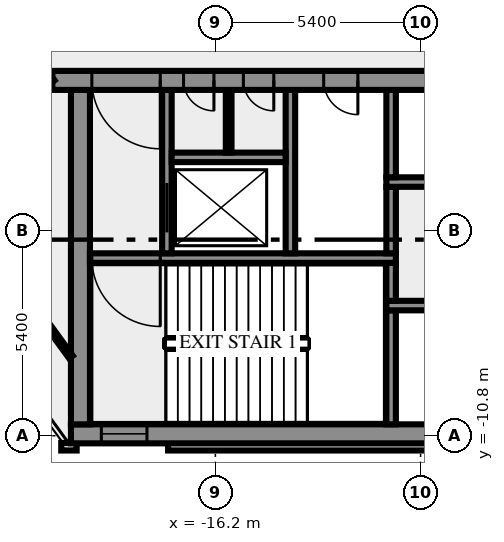
"""IFC4 building model, lengths in metres.
Left out: names, types, materials, properties, quantities, classifications, styles, units other than length and angle.
Written with IfcOpenShell. Run it as: python <this file> out.ifc"""

import sys

from ifc_helpers import new_model, si_unit, direction, frame, frame_2d, origin, place, context, subcontext, project, spatial, rectangle, extrude, element, fill, save


model = new_model("IFC4")
c1 = context("Model", 3, precision=1e-05, world=origin(), true_north=direction((0.0, 1.0)))
c2 = subcontext(c1, "Body", "Model", "MODEL_VIEW")
j1 = project(units=[si_unit("LENGTHUNIT", "METRE"), si_unit("PLANEANGLEUNIT", "RADIAN")], contexts=[c1])
p1 = place(None, origin())
s1 = spatial("IfcSite", under=j1, at=p1, CompositionType="ELEMENT")
p2 = place(p1, origin())
s2 = spatial("IfcBuilding", under=s1, at=p2, CompositionType="ELEMENT")
p3 = place(p2, frame((0.0, 0.0, 273.0)))
s3 = spatial("IfcBuildingStorey", under=s2, at=p3, CompositionType="ELEMENT", Elevation=273.0)
p4 = place(p3, frame((-20.256, -11.088, 0.0), z_axis=(0.0, 0.0, 1.0), x_axis=(1.0, 0.0, 0.0)))
e1 = element("IfcWall", 1, at=p4, inside=s3, PredefinedType="SOLIDWALL", context=c2, shape_type="SweptSolid", body=[
    extrude(rectangle(XDim=0.406, YDim=0.2, at=frame_2d((0.203, 0.0))), origin(), (0.0, 0.0, 1.0), 7.65),
])
p5 = place(p3, frame((-17.444, -11.088, 0.0), z_axis=(0.0, 0.0, 1.0), x_axis=(1.0, 0.0, 0.0)))
e2 = element("IfcWall", 2, at=p5, inside=s3, PredefinedType="SOLIDWALL", context=c2, shape_type="SweptSolid", body=[
    extrude(rectangle(XDim=34.888, YDim=0.2, at=frame_2d((17.444, 0.0))), origin(), (0.0, 0.0, 1.0), 7.65),
])
p6 = place(p3, frame((-20.0, -10.75, 0.0), z_axis=(0.0, 0.0, 1.0), x_axis=(1.0, 0.0, 0.0)))
e3 = element("IfcWall", 3, at=p6, inside=s3, PredefinedType="SHEAR", context=c2, shape_type="SweptSolid", body=[
    extrude(rectangle(XDim=40.0, YDim=0.5, at=frame_2d((20.0, 0.0))), origin(), (0.0, 0.0, 1.0), 7.65),
])
p7 = place(p6, frame((0.8, 0.0, 1.0)))
e4 = element("IfcOpeningElement", 4, at=p7, cuts=e3, PredefinedType="OPENING", context=c2, shape_type="SweptSolid", body=[
    extrude(rectangle(XDim=1.2, YDim=1.2, at=frame_2d((0.6, 0.6))), frame((0.0, 0.26, 0.0), z_axis=(0.0, -1.0, 0.0), x_axis=(1.0, 0.0, 0.0)), (0.0, 0.0, 1.0), 0.52),
])
p8 = place(p6, frame((38.0, 0.0, 1.0)))
e5 = element("IfcOpeningElement", 5, at=p8, cuts=e3, PredefinedType="OPENING", context=c2, shape_type="SweptSolid", body=[
    extrude(rectangle(XDim=1.2, YDim=1.2, at=frame_2d((0.6, 0.6))), frame((0.0, 0.26, 0.0), z_axis=(0.0, -1.0, 0.0), x_axis=(1.0, 0.0, 0.0)), (0.0, 0.0, 1.0), 0.52),
])
p9 = place(p3, frame((-19.75, -10.5, 0.0), z_axis=(0.0, 0.0, 1.0), x_axis=(0.0, 1.0, 0.0)))
e6 = element("IfcWall", 6, at=p9, inside=s3, PredefinedType="SHEAR", context=c2, shape_type="SweptSolid", body=[
    extrude(rectangle(XDim=8.8, YDim=0.5, at=frame_2d((4.4, 0.0))), origin(), (0.0, 0.0, 1.0), 7.65),
])
p10 = place(p3, frame((-11.575, -10.5, 0.0), z_axis=(0.0, 0.0, 1.0), x_axis=(0.0, 1.0, 0.0)))
e7 = element("IfcWall", 7, at=p10, inside=s3, PredefinedType="SHEAR", context=c2, shape_type="SweptSolid", body=[
    extrude(rectangle(XDim=3.0, YDim=0.25, at=frame_2d((1.5, 0.0))), origin(), (0.0, 0.0, 1.0), 7.65),
])
p11 = place(p3, frame((11.7, -7.375, 0.0), z_axis=(0.0, 0.0, 1.0), x_axis=(-1.0, 0.0, 0.0)))
e8 = element("IfcWall", 8, at=p11, inside=s3, PredefinedType="SHEAR", context=c2, shape_type="SweptSolid", body=[
    extrude(rectangle(XDim=23.4, YDim=0.25, at=frame_2d((11.7, 0.0))), origin(), (0.0, 0.0, 1.0), 7.65),
])
p12 = place(p11, frame((14.5, 0.0, 0.0)))
e9 = element("IfcOpeningElement", 9, at=p12, cuts=e8, PredefinedType="OPENING", context=c2, shape_type="SweptSolid", body=[
    extrude(rectangle(XDim=0.9, YDim=2.1, at=frame_2d((0.45, 1.05))), frame((0.0, 0.135, 0.0), z_axis=(0.0, -1.0, 0.0), x_axis=(1.0, 0.0, 0.0)), (0.0, 0.0, 1.0), 0.27),
])
p13 = place(p11, frame((12.95, 0.0, 0.0)))
e10 = element("IfcOpeningElement", 10, at=p13, cuts=e8, PredefinedType="OPENING", context=c2, shape_type="SweptSolid", body=[
    extrude(rectangle(XDim=0.9, YDim=2.1, at=frame_2d((0.45, 1.05))), frame((0.0, 0.135, 0.0), z_axis=(0.0, -1.0, 0.0), x_axis=(1.0, 0.0, 0.0)), (0.0, 0.0, 1.0), 0.27),
])
p14 = place(p11, frame((10.95, 0.0, 0.0)))
e11 = element("IfcOpeningElement", 11, at=p14, cuts=e8, PredefinedType="OPENING", context=c2, shape_type="SweptSolid", body=[
    extrude(rectangle(XDim=0.9, YDim=2.1, at=frame_2d((0.45, 1.05))), frame((0.0, 0.135, 0.0), z_axis=(0.0, -1.0, 0.0), x_axis=(1.0, 0.0, 0.0)), (0.0, 0.0, 1.0), 0.27),
])
p15 = place(p11, frame((7.6, 0.0, 0.0)))
e12 = element("IfcOpeningElement", 12, at=p15, cuts=e8, PredefinedType="OPENING", context=c2, shape_type="SweptSolid", body=[
    extrude(rectangle(XDim=0.9, YDim=2.1, at=frame_2d((0.45, 1.05))), frame((0.0, 0.135, 0.0), z_axis=(0.0, -1.0, 0.0), x_axis=(1.0, 0.0, 0.0)), (0.0, 0.0, 1.0), 0.27),
])
p16 = place(p11, frame((2.338, 0.0, 0.0)))
e13 = element("IfcOpeningElement", 13, at=p16, cuts=e8, PredefinedType="OPENING", context=c2, shape_type="SweptSolid", body=[
    extrude(rectangle(XDim=0.9, YDim=2.1, at=frame_2d((0.45, 1.05))), frame((0.0, 0.135, 0.0), z_axis=(0.0, -1.0, 0.0), x_axis=(1.0, 0.0, 0.0)), (0.0, 0.0, 1.0), 0.27),
])
p17 = place(p3, frame((-11.575, -7.25, 0.0), z_axis=(0.0, 0.0, 1.0), x_axis=(0.0, 1.0, 0.0)))
e14 = element("IfcWall", 14, at=p17, inside=s3, PredefinedType="SHEAR", context=c2, shape_type="SweptSolid", body=[
    extrude(rectangle(XDim=1.0, YDim=0.25, at=frame_2d((0.5, 0.0))), origin(), (0.0, 0.0, 1.0), 7.65),
])
p18 = place(p3, frame((-11.45, -6.125, 0.0), z_axis=(0.0, 0.0, 1.0), x_axis=(-1.0, 0.0, 0.0)))
e15 = element("IfcWall", 15, at=p18, inside=s3, PredefinedType="SHEAR", context=c2, shape_type="SweptSolid", body=[
    extrude(rectangle(XDim=8.05, YDim=0.25, at=frame_2d((4.025, 0.0))), origin(), (0.0, 0.0, 1.0), 7.65),
])
p19 = place(p18, frame((6.2, 0.0, 0.0)))
e16 = element("IfcOpeningElement", 16, at=p19, cuts=e15, PredefinedType="OPENING", context=c2, shape_type="SweptSolid", body=[
    extrude(rectangle(XDim=1.8, YDim=2.1, at=frame_2d((0.9, 1.05))), frame((0.0, 0.135, 0.0), z_axis=(0.0, -1.0, 0.0), x_axis=(1.0, 0.0, 0.0)), (0.0, 0.0, 1.0), 0.27),
])
p20 = place(p3, frame((-17.475, -6.0, 0.0), z_axis=(0.0, 0.0, 1.0), x_axis=(0.0, 1.0, 0.0)))
e17 = element("IfcWall", 17, at=p20, inside=s3, PredefinedType="SHEAR", context=c2, shape_type="SweptSolid", body=[
    extrude(rectangle(XDim=4.3, YDim=0.25, at=frame_2d((2.15, 0.0))), origin(), (0.0, 0.0, 1.0), 7.65),
])
p21 = place(p20, frame((0.55, 0.0, 0.0)))
e18 = element("IfcOpeningElement", 18, at=p21, cuts=e17, PredefinedType="OPENING", context=c2, shape_type="SweptSolid", body=[
    extrude(rectangle(XDim=1.3, YDim=2.1, at=frame_2d((0.65, 1.05))), frame((0.0, 0.135, 0.0), z_axis=(0.0, -1.0, 0.0), x_axis=(1.0, 0.0, 0.0)), (0.0, 0.0, 1.0), 0.27),
])
p22 = place(p3, frame((-14.225, -6.0, 0.0), z_axis=(0.0, 0.0, 1.0), x_axis=(0.0, 1.0, 0.0)))
e19 = element("IfcWall", 19, at=p22, inside=s3, PredefinedType="SHEAR", context=c2, shape_type="SweptSolid", body=[
    extrude(rectangle(XDim=4.3, YDim=0.25, at=frame_2d((2.15, 0.0))), origin(), (0.0, 0.0, 1.0), 7.65),
])
p23 = place(p3, frame((-11.575, -6.0, 0.0), z_axis=(0.0, 0.0, 1.0), x_axis=(0.0, 1.0, 0.0)))
e20 = element("IfcWall", 20, at=p23, inside=s3, PredefinedType="SHEAR", context=c2, shape_type="SweptSolid", body=[
    extrude(rectangle(XDim=1.75, YDim=0.25, at=frame_2d((0.875, 0.0))), origin(), (0.0, 0.0, 1.0), 7.65),
])
p24 = place(p3, frame((-11.7, -4.125, 0.0), z_axis=(0.0, 0.0, 1.0), x_axis=(1.0, 0.0, 0.0)))
e21 = element("IfcWall", 21, at=p24, inside=s3, PredefinedType="SHEAR", context=c2, shape_type="SweptSolid", body=[
    extrude(rectangle(XDim=7.75, YDim=0.25, at=frame_2d((3.875, 0.0))), origin(), (0.0, 0.0, 1.0), 7.65),
])
p25 = place(p3, frame((-11.575, -4.0, 0.0), z_axis=(0.0, 0.0, 1.0), x_axis=(0.0, 1.0, 0.0)))
e22 = element("IfcWall", 22, at=p25, inside=s3, PredefinedType="SHEAR", context=c2, shape_type="SweptSolid", body=[
    extrude(rectangle(XDim=2.3, YDim=0.25, at=frame_2d((1.15, 0.0))), origin(), (0.0, 0.0, 1.0), 7.65),
])
p26 = place(p3, frame((-17.35, -3.475, 0.0), z_axis=(0.0, 0.0, 1.0), x_axis=(1.0, 0.0, 0.0)))
e23 = element("IfcWall", 23, at=p26, inside=s3, PredefinedType="SHEAR", context=c2, shape_type="SweptSolid", body=[
    extrude(rectangle(XDim=3.0, YDim=0.25, at=frame_2d((1.5, 0.0))), origin(), (0.0, 0.0, 1.0), 7.65),
])
p27 = place(p3, frame((-15.85, -3.35, 0.0), z_axis=(0.0, 0.0, 1.0), x_axis=(0.0, 1.0, 0.0)))
e24 = element("IfcWall", 24, at=p27, inside=s3, PredefinedType="PARTITIONING", context=c2, shape_type="SweptSolid", body=[
    extrude(rectangle(XDim=1.65, YDim=0.15, at=frame_2d((0.825, 0.0))), origin(), (0.0, 0.0, 1.0), 7.65),
])
p28 = place(p3, frame((20.49, -1.45, 0.0), z_axis=(0.0, 0.0, 1.0), x_axis=(-1.0, 0.0, 0.0)))
e25 = element("IfcWall", 25, at=p28, inside=s3, PredefinedType="SHEAR", context=c2, shape_type="SweptSolid", body=[
    extrude(rectangle(XDim=40.98, YDim=0.5, at=frame_2d((20.49, 0.0))), origin(), (0.0, 0.0, 1.0), 7.65),
])
p29 = place(p28, frame((38.14, 0.0, 0.0)))
e26 = element("IfcOpeningElement", 26, at=p29, cuts=e25, PredefinedType="OPENING", context=c2, shape_type="SweptSolid", body=[
    extrude(rectangle(XDim=1.8, YDim=2.1, at=frame_2d((0.9, 1.05))), frame((0.0, 0.26, 0.0), z_axis=(0.0, -1.0, 0.0), x_axis=(1.0, 0.0, 0.0)), (0.0, 0.0, 1.0), 0.52),
])
p30 = place(p28, frame((36.728, 0.0, 0.0)))
e27 = element("IfcOpeningElement", 27, at=p30, cuts=e25, PredefinedType="OPENING", context=c2, shape_type="SweptSolid", body=[
    extrude(rectangle(XDim=0.8, YDim=2.1, at=frame_2d((0.4, 1.05))), frame((0.0, 0.26, 0.0), z_axis=(0.0, -1.0, 0.0), x_axis=(1.0, 0.0, 0.0)), (0.0, 0.0, 1.0), 0.52),
])
p31 = place(p28, frame((35.153, 0.0, 0.0)))
e28 = element("IfcOpeningElement", 28, at=p31, cuts=e25, PredefinedType="OPENING", context=c2, shape_type="SweptSolid", body=[
    extrude(rectangle(XDim=0.8, YDim=2.1, at=frame_2d((0.4, 1.05))), frame((0.0, 0.26, 0.0), z_axis=(0.0, -1.0, 0.0), x_axis=(1.0, 0.0, 0.0)), (0.0, 0.0, 1.0), 0.52),
])
p32 = place(p28, frame((32.94, 0.0, 0.0)))
e29 = element("IfcOpeningElement", 29, at=p32, cuts=e25, PredefinedType="OPENING", context=c2, shape_type="SweptSolid", body=[
    extrude(rectangle(XDim=0.9, YDim=2.1, at=frame_2d((0.45, 1.05))), frame((0.0, 0.26, 0.0), z_axis=(0.0, -1.0, 0.0), x_axis=(1.0, 0.0, 0.0)), (0.0, 0.0, 1.0), 0.52),
])
p33 = place(p28, frame((20.74, 0.0, 0.0)))
e30 = element("IfcOpeningElement", 30, at=p33, cuts=e25, PredefinedType="OPENING", context=c2, shape_type="SweptSolid", body=[
    extrude(rectangle(XDim=2.0, YDim=2.1, at=frame_2d((1.0, 1.05))), frame((0.0, 0.26, 0.0), z_axis=(0.0, -1.0, 0.0), x_axis=(1.0, 0.0, 0.0)), (0.0, 0.0, 1.0), 0.52),
])
p34 = place(p28, frame((14.903, 0.0, 0.0)))
e31 = element("IfcOpeningElement", 31, at=p34, cuts=e25, PredefinedType="OPENING", context=c2, shape_type="SweptSolid", body=[
    extrude(rectangle(XDim=0.9, YDim=2.1, at=frame_2d((0.45, 1.05))), frame((0.0, 0.26, 0.0), z_axis=(0.0, -1.0, 0.0), x_axis=(1.0, 0.0, 0.0)), (0.0, 0.0, 1.0), 0.52),
])
p35 = place(p28, frame((12.54, 0.0, 0.0)))
e32 = element("IfcOpeningElement", 32, at=p35, cuts=e25, PredefinedType="OPENING", context=c2, shape_type="SweptSolid", body=[
    extrude(rectangle(XDim=0.9, YDim=2.1, at=frame_2d((0.45, 1.05))), frame((0.0, 0.26, 0.0), z_axis=(0.0, -1.0, 0.0), x_axis=(1.0, 0.0, 0.0)), (0.0, 0.0, 1.0), 0.52),
])
p36 = place(p28, frame((9.877, 0.0, 0.0)))
e33 = element("IfcOpeningElement", 33, at=p36, cuts=e25, PredefinedType="OPENING", context=c2, shape_type="SweptSolid", body=[
    extrude(rectangle(XDim=0.9, YDim=2.1, at=frame_2d((0.45, 1.05))), frame((0.0, 0.26, 0.0), z_axis=(0.0, -1.0, 0.0), x_axis=(1.0, 0.0, 0.0)), (0.0, 0.0, 1.0), 0.52),
])
p37 = place(p28, frame((7.14, 0.0, 0.0)))
e34 = element("IfcOpeningElement", 34, at=p37, cuts=e25, PredefinedType="OPENING", context=c2, shape_type="SweptSolid", body=[
    extrude(rectangle(XDim=0.9, YDim=2.1, at=frame_2d((0.45, 1.05))), frame((0.0, 0.26, 0.0), z_axis=(0.0, -1.0, 0.0), x_axis=(1.0, 0.0, 0.0)), (0.0, 0.0, 1.0), 0.52),
])
p38 = place(p28, frame((4.19, 0.0, 0.0)))
e35 = element("IfcOpeningElement", 35, at=p38, cuts=e25, PredefinedType="OPENING", context=c2, shape_type="SweptSolid", body=[
    extrude(rectangle(XDim=0.9, YDim=2.1, at=frame_2d((0.45, 1.05))), frame((0.0, 0.26, 0.0), z_axis=(0.0, -1.0, 0.0), x_axis=(1.0, 0.0, 0.0)), (0.0, 0.0, 1.0), 0.52),
])
p39 = place(p28, frame((1.04, 0.0, 0.0)))
e36 = element("IfcOpeningElement", 36, at=p39, cuts=e25, PredefinedType="OPENING", context=c2, shape_type="SweptSolid", body=[
    extrude(rectangle(XDim=1.8, YDim=2.1, at=frame_2d((0.9, 1.05))), frame((0.0, 0.26, 0.0), z_axis=(0.0, -1.0, 0.0), x_axis=(1.0, 0.0, 0.0)), (0.0, 0.0, 1.0), 0.52),
])
p40 = place(p3, frame((-20.531, -1.523, 0.0), z_axis=(0.0, 0.0, 1.0), x_axis=(-0.587782944784, 0.809018670873, 0.0)))
e37 = element("IfcWall", 37, at=p40, inside=s3, PredefinedType="SOLIDWALL", context=c2, shape_type="SweptSolid", body=[
    extrude(rectangle(XDim=21.512, YDim=0.25, at=frame_2d((10.756, 0.0))), origin(), (0.0, 0.0, 1.0), 7.65),
])
p41 = place(p40, frame((0.533, 0.0, 0.0)))
e38 = element("IfcOpeningElement", 38, at=p41, cuts=e37, PredefinedType="OPENING", context=c2, shape_type="SweptSolid", body=[
    extrude(rectangle(XDim=0.9, YDim=2.1, at=frame_2d((0.45, 1.05))), frame((0.0, 0.135, 0.0), z_axis=(0.0, -1.0, 0.0), x_axis=(1.0, 0.0, 0.0)), (0.0, 0.0, 1.0), 0.27),
])
p42 = place(p40, frame((19.87, 0.0, 0.0)))
e39 = element("IfcOpeningElement", 39, at=p42, cuts=e37, PredefinedType="OPENING", context=c2, shape_type="SweptSolid", body=[
    extrude(rectangle(XDim=1.2, YDim=2.1, at=frame_2d((0.6, 1.05))), frame((0.0, 0.135, 0.0), z_axis=(0.0, -1.0, 0.0), x_axis=(1.0, 0.0, 0.0)), (0.0, 0.0, 1.0), 0.27),
])
p43 = place(p3, frame((-21.004, -7.348, 0.0), z_axis=(0.0, 0.0, 1.0), x_axis=(0.588018712203, -0.808847324345, 0.0)))
e40 = element("IfcWall", 40, at=p43, inside=s3, PredefinedType="PARTITIONING", context=c2, shape_type="SweptSolid", body=[
    extrude(rectangle(XDim=1.708, YDim=0.12, at=frame_2d((0.854, 0.0))), origin(), (0.0, 0.0, 1.0), 7.65),
])
p44 = place(p7, origin())
e41 = element("IfcWindow", 41, at=p44, inside=s3, PartitioningType="SINGLE_PANEL", PredefinedType="WINDOW", context=c2, shape_type="SweptSolid", body=[
    extrude(rectangle(XDim=1.2, YDim=1.2, at=frame_2d((0.6, 0.6))), frame((0.0, 0.03, 0.0), z_axis=(0.0, -1.0, 0.0), x_axis=(1.0, 0.0, 0.0)), (0.0, 0.0, 1.0), 0.06),
])
fill(e4, e41)
p45 = place(p19, origin())
e42 = element("IfcDoor", 42, at=p45, inside=s3, OperationType="DOUBLE_DOOR_SINGLE_SWING", PredefinedType="DOOR", context=c2, shape_type="SweptSolid", body=[
    extrude(rectangle(XDim=1.8, YDim=2.1, at=frame_2d((0.9, 1.05))), frame((0.0, 0.025, 0.0), z_axis=(0.0, -1.0, 0.0), x_axis=(1.0, 0.0, 0.0)), (0.0, 0.0, 1.0), 0.05),
])
fill(e16, e42)
p46 = place(p21, origin())
e43 = element("IfcDoor", 43, at=p46, inside=s3, OperationType="DOUBLE_DOOR_SLIDING", PredefinedType="DOOR", context=c2, shape_type="SweptSolid", body=[
    extrude(rectangle(XDim=1.3, YDim=2.1, at=frame_2d((0.65, 1.05))), frame((0.0, 0.025, 0.0), z_axis=(0.0, -1.0, 0.0), x_axis=(1.0, 0.0, 0.0)), (0.0, 0.0, 1.0), 0.05),
])
fill(e18, e43)
p47 = place(p29, origin())
e44 = element("IfcDoor", 44, at=p47, inside=s3, OperationType="DOUBLE_DOOR_SINGLE_SWING", PredefinedType="DOOR", context=c2, shape_type="SweptSolid", body=[
    extrude(rectangle(XDim=1.8, YDim=2.1, at=frame_2d((0.9, 1.05))), frame((0.0, 0.025, 0.0), z_axis=(0.0, -1.0, 0.0), x_axis=(1.0, 0.0, 0.0)), (0.0, 0.0, 1.0), 0.05),
])
fill(e26, e44)
p48 = place(p30, origin())
e45 = element("IfcDoor", 45, at=p48, inside=s3, OperationType="SINGLE_SWING_RIGHT", PredefinedType="DOOR", context=c2, shape_type="SweptSolid", body=[
    extrude(rectangle(XDim=0.8, YDim=2.1, at=frame_2d((0.4, 1.05))), frame((0.0, 0.025, 0.0), z_axis=(0.0, -1.0, 0.0), x_axis=(1.0, 0.0, 0.0)), (0.0, 0.0, 1.0), 0.05),
])
fill(e27, e45)
p49 = place(p31, origin())
e46 = element("IfcDoor", 46, at=p49, inside=s3, OperationType="SINGLE_SWING_RIGHT", PredefinedType="DOOR", context=c2, shape_type="SweptSolid", body=[
    extrude(rectangle(XDim=0.8, YDim=2.1, at=frame_2d((0.4, 1.05))), frame((0.0, 0.025, 0.0), z_axis=(0.0, -1.0, 0.0), x_axis=(1.0, 0.0, 0.0)), (0.0, 0.0, 1.0), 0.05),
])
fill(e28, e46)
p50 = place(p32, origin())
e47 = element("IfcDoor", 47, at=p50, inside=s3, OperationType="SINGLE_SWING_RIGHT", PredefinedType="DOOR", context=c2, shape_type="SweptSolid", body=[
    extrude(rectangle(XDim=0.9, YDim=2.1, at=frame_2d((0.45, 1.05))), frame((0.0, 0.025, 0.0), z_axis=(0.0, -1.0, 0.0), x_axis=(1.0, 0.0, 0.0)), (0.0, 0.0, 1.0), 0.05),
])
fill(e29, e47)
save(model, sys.argv[1])
